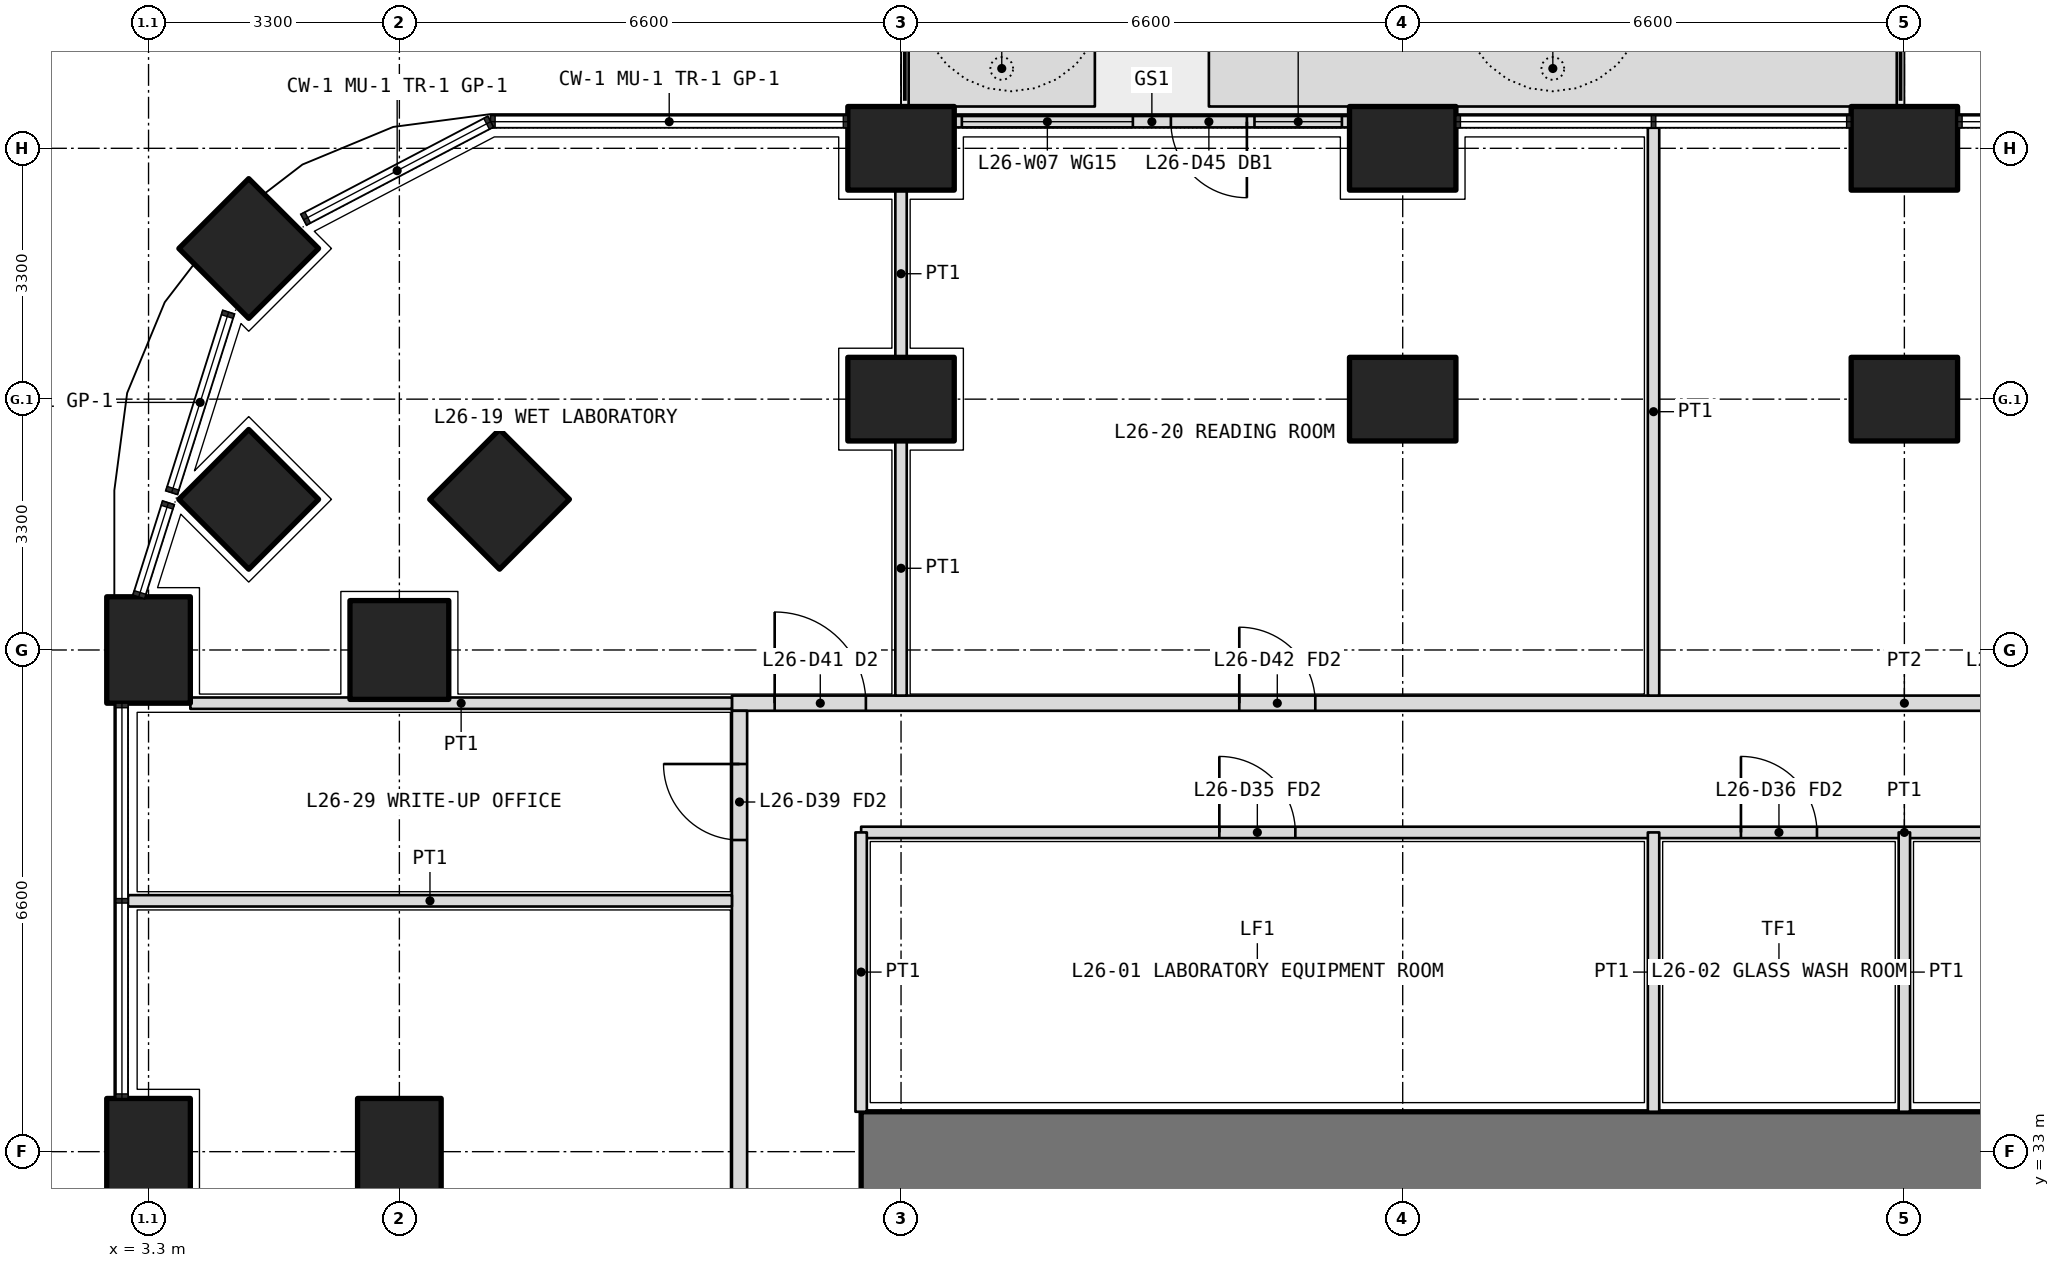
"""IFC4 building model, lengths in metres.
Left out: names, types, materials, properties, quantities, classifications, styles, units other than length and angle.
Written with IfcOpenShell. Run it as: python <this file> out.ifc"""

import sys

from ifc_helpers import new_model, si_unit, direction, frame, frame_2d, origin, origin_2d, place, context, subcontext, project, spatial, polyline, rectangle, outline, extrude, element, fill, save


model = new_model("IFC4")
c1 = context("Model", 3, precision=1e-05, world=origin(), true_north=direction((0.0, 1.0)))
c2 = subcontext(c1, "Body", "Model", "MODEL_VIEW")
j1 = project(units=[si_unit("LENGTHUNIT", "METRE"), si_unit("PLANEANGLEUNIT", "RADIAN")], contexts=[c1])
p1 = place(None, origin())
s1 = spatial("IfcSite", under=j1, at=p1, CompositionType="ELEMENT")
p2 = place(p1, origin())
s2 = spatial("IfcBuilding", under=s1, at=p2, CompositionType="ELEMENT")
p3 = place(p2, frame((0.0, 0.0, 115.8)))
s3 = spatial("IfcBuildingStorey", under=s2, at=p3, CompositionType="ELEMENT", Elevation=115.8)
p4 = place(p3, frame((4.618, 44.882, 0.0), z_axis=(0.0, 0.0, 1.0), x_axis=(0.707106781187, 0.707106781187, 0.0)))
e1 = element("IfcColumn", 1, at=p4, inside=s3, PredefinedType="COLUMN", context=c2, shape_type="SweptSolid", body=[
    extrude(rectangle(XDim=1.3, YDim=1.3, at=origin_2d()), origin(), (0.0, 0.0, 1.0), 4.2),
])
for number, where, z_axis, x_axis in (
    (2, (3.3, 33.0, 0.0), (0.0, 0.0, 1.0), (0.0, 1.0, 0.0)),
    (3, (3.3, 39.6, 0.0), (0.0, 0.0, 1.0), (0.0, 1.0, 0.0)),
    (4, (13.2, 46.2, 0.0), (0.0, 0.0, 1.0), (1.0, 0.0, 0.0)),
    (5, (19.8, 46.2, 0.0), (0.0, 0.0, 1.0), (1.0, 0.0, 0.0)),
    (6, (26.4, 46.2, 0.0), (0.0, 0.0, 1.0), (1.0, 0.0, 0.0)),
):
    element("IfcColumn", number, at=place(p3, frame(where, z_axis=z_axis, x_axis=x_axis)), inside=s3, PredefinedType="COLUMN", context=c2, shape_type="SweptSolid", body=[
        extrude(rectangle(XDim=1.4, YDim=1.1, at=origin_2d()), origin(), (0.0, 0.0, 1.0), 4.2),
    ])
for number, where, z_axis, x_axis in (
    (7, (6.6, 39.6, 0.0), (0.0, 0.0, 1.0), (1.0, 0.0, 0.0)),
    (8, (4.618, 41.582, 0.0), (0.0, 0.0, 1.0), (0.707, 0.707, 0.0)),
):
    element("IfcColumn", number, at=place(p3, frame(where, z_axis=z_axis, x_axis=x_axis)), inside=s3, PredefinedType="COLUMN", context=c2, shape_type="SweptSolid", body=[
        extrude(rectangle(XDim=1.3, YDim=1.3, at=origin_2d()), origin(), (0.0, 0.0, 1.0), 4.2),
    ])
for number, where, z_axis, x_axis in (
    (9, (13.2, 42.9, 0.0), (0.0, 0.0, 1.0), (1.0, 0.0, 0.0)),
    (10, (19.8, 42.9, 0.0), (0.0, 0.0, 1.0), (1.0, 0.0, 0.0)),
    (11, (26.4, 42.9, 0.0), (0.0, 0.0, 1.0), (1.0, 0.0, 0.0)),
):
    element("IfcColumn", number, at=place(p3, frame(where, z_axis=z_axis, x_axis=x_axis)), inside=s3, PredefinedType="COLUMN", context=c2, shape_type="SweptSolid", body=[
        extrude(rectangle(XDim=1.4, YDim=1.1, at=origin_2d()), origin(), (0.0, 0.0, 1.0), 4.2),
    ])
p5 = place(p3, frame((7.918, 41.582, 0.0), z_axis=(0.0, 0.0, 1.0), x_axis=(0.707106781187, 0.707106781187, 0.0)))
e12 = element("IfcColumn", 12, at=p5, inside=s3, PredefinedType="COLUMN", context=c2, shape_type="SweptSolid", body=[
    extrude(rectangle(XDim=1.3, YDim=1.3, at=origin_2d()), origin(), (0.0, 0.0, 1.0), 4.2),
])
p6 = place(p3, frame((6.6, 33.0, 0.0), z_axis=(0.0, 0.0, 1.0), x_axis=(0.0, 1.0, 0.0)))
e13 = element("IfcColumn", 13, at=p6, inside=s3, PredefinedType="COLUMN", context=c2, shape_type="SweptSolid", body=[
    extrude(rectangle(XDim=1.4, YDim=1.1, at=origin_2d()), origin(), (0.0, 0.0, 1.0), 4.2),
])
p7 = place(p3, origin())
e14 = element("IfcWall", 14, at=p7, inside=s3, PredefinedType="USERDEFINED", context=c2, shape_type="SweptSolid", body=[
    extrude(outline(polyline([(13.3, 46.75), (15.75, 46.75), (15.75, 47.75), (13.3, 47.75), (13.3, 46.75)]), holes=[polyline([(13.45, 46.9), (15.6, 46.9), (15.6, 47.6), (13.45, 47.6), (13.45, 46.9)])]), origin(), (0.0, 0.0, 1.0), 1.05),
])
p8 = place(p3, origin())
e15 = element("IfcWall", 15, at=p8, inside=s3, PredefinedType="USERDEFINED", context=c2, shape_type="SweptSolid", body=[
    extrude(outline(polyline([(17.25, 46.75), (26.3, 46.75), (26.3, 47.75), (17.25, 47.75), (17.25, 46.75)]), holes=[polyline([(17.4, 46.9), (26.15, 46.9), (26.15, 47.6), (17.4, 47.6), (17.4, 46.9)])]), origin(), (0.0, 0.0, 1.0), 1.05),
])
p9 = place(p3, frame((19.1, 46.55, 0.0), z_axis=(0.0, 0.0, 1.0), x_axis=(-1.0, 0.0, 0.0)))
e16 = element("IfcWall", 16, at=p9, inside=s3, PredefinedType="SOLIDWALL", context=c2, shape_type="SweptSolid", body=[
    extrude(rectangle(XDim=5.2, YDim=0.15, at=frame_2d((2.6, 0.0))), origin(), (0.0, 0.0, 1.0), 2.7),
])
p10 = place(p9, frame((1.35, 0.0, 0.0)))
e17 = element("IfcOpeningElement", 17, at=p10, cuts=e16, PredefinedType="OPENING", context=c2, shape_type="SweptSolid", body=[
    extrude(rectangle(XDim=1.0, YDim=2.4, at=frame_2d((0.5, 1.2))), frame((0.0, 0.085, 0.0), z_axis=(0.0, -1.0, 0.0), x_axis=(1.0, 0.0, 0.0)), (0.0, 0.0, 1.0), 0.17),
])
p11 = place(p9, frame((0.1, 0.0, 0.1)))
e18 = element("IfcOpeningElement", 18, at=p11, cuts=e16, PredefinedType="OPENING", context=c2, shape_type="SweptSolid", body=[
    extrude(rectangle(XDim=1.15, YDim=2.3, at=frame_2d((0.575, 1.15))), frame((0.0, 0.085, 0.0), z_axis=(0.0, -1.0, 0.0), x_axis=(1.0, 0.0, 0.0)), (0.0, 0.0, 1.0), 0.17),
])
p12 = place(p9, frame((2.85, 0.0, 0.1)))
e19 = element("IfcOpeningElement", 19, at=p12, cuts=e16, PredefinedType="OPENING", context=c2, shape_type="SweptSolid", body=[
    extrude(rectangle(XDim=2.25, YDim=2.3, at=frame_2d((1.125, 1.15))), frame((0.0, 0.085, 0.0), z_axis=(0.0, -1.0, 0.0), x_axis=(1.0, 0.0, 0.0)), (0.0, 0.0, 1.0), 0.17),
])
p13 = place(p3, frame((40.125, 33.0, 0.0), z_axis=(0.0, 0.0, 1.0), x_axis=(-1.0, 0.0, 0.0)))
e20 = element("IfcWall", 20, at=p13, inside=s3, PredefinedType="SHEAR", context=c2, shape_type="SweptSolid", body=[
    extrude(rectangle(XDim=27.45, YDim=1.05, at=frame_2d((13.725, 0.0))), origin(), (0.0, 0.0, 1.0), 4.2),
])
p14 = place(p3, frame((12.675, 37.2, 0.0), z_axis=(0.0, 0.0, 1.0), x_axis=(1.0, 0.0, 0.0)))
e21 = element("IfcWall", 21, at=p14, inside=s3, PredefinedType="PARTITIONING", context=c2, shape_type="SweptSolid", body=[
    extrude(rectangle(XDim=27.45, YDim=0.15, at=frame_2d((13.725, 0.0))), origin(), (0.0, 0.0, 1.0), 2.85),
])
p15 = place(p14, frame((4.712, 0.0, 0.0)))
e22 = element("IfcOpeningElement", 22, at=p15, cuts=e21, PredefinedType="OPENING", context=c2, shape_type="SweptSolid", body=[
    extrude(rectangle(XDim=1.0, YDim=2.1, at=frame_2d((0.5, 1.05))), frame((0.0, 0.085, 0.0), z_axis=(0.0, -1.0, 0.0), x_axis=(1.0, 0.0, 0.0)), (0.0, 0.0, 1.0), 0.17),
])
p16 = place(p14, frame((11.575, 0.0, 0.0)))
e23 = element("IfcOpeningElement", 23, at=p16, cuts=e21, PredefinedType="OPENING", context=c2, shape_type="SweptSolid", body=[
    extrude(rectangle(XDim=1.0, YDim=2.1, at=frame_2d((0.5, 1.05))), frame((0.0, 0.085, 0.0), z_axis=(0.0, -1.0, 0.0), x_axis=(1.0, 0.0, 0.0)), (0.0, 0.0, 1.0), 0.17),
])
p17 = place(p14, frame((18.175, 0.0, 0.0)))
e24 = element("IfcOpeningElement", 24, at=p17, cuts=e21, PredefinedType="OPENING", context=c2, shape_type="SweptSolid", body=[
    extrude(rectangle(XDim=1.0, YDim=2.1, at=frame_2d((0.5, 1.05))), frame((0.0, 0.085, 0.0), z_axis=(0.0, -1.0, 0.0), x_axis=(1.0, 0.0, 0.0)), (0.0, 0.0, 1.0), 0.17),
])
p18 = place(p14, frame((25.038, 0.0, 0.0)))
e25 = element("IfcOpeningElement", 25, at=p18, cuts=e21, PredefinedType="OPENING", context=c2, shape_type="SweptSolid", body=[
    extrude(rectangle(XDim=1.0, YDim=2.1, at=frame_2d((0.5, 1.05))), frame((0.0, 0.085, 0.0), z_axis=(0.0, -1.0, 0.0), x_axis=(1.0, 0.0, 0.0)), (0.0, 0.0, 1.0), 0.17),
])
p19 = place(p3, frame((12.675, 33.525, 0.0), z_axis=(0.0, 0.0, 1.0), x_axis=(0.0, 1.0, 0.0)))
e26 = element("IfcWall", 26, at=p19, inside=s3, PredefinedType="PARTITIONING", context=c2, shape_type="SweptSolid", body=[
    extrude(rectangle(XDim=3.675, YDim=0.15, at=frame_2d((1.837, 0.0))), origin(), (0.0, 0.0, 1.0), 2.85),
])
p20 = place(p3, frame((23.1, 33.525, 0.0), z_axis=(0.0, 0.0, 1.0), x_axis=(0.0, 1.0, 0.0)))
e27 = element("IfcWall", 27, at=p20, inside=s3, PredefinedType="PARTITIONING", context=c2, shape_type="SweptSolid", body=[
    extrude(rectangle(XDim=3.675, YDim=0.15, at=frame_2d((1.837, 0.0))), origin(), (0.0, 0.0, 1.0), 3.9),
])
p21 = place(p3, frame((26.4, 33.525, 0.0), z_axis=(0.0, 0.0, 1.0), x_axis=(0.0, 1.0, 0.0)))
e28 = element("IfcWall", 28, at=p21, inside=s3, PredefinedType="PARTITIONING", context=c2, shape_type="SweptSolid", body=[
    extrude(rectangle(XDim=3.675, YDim=0.15, at=frame_2d((1.837, 0.0))), origin(), (0.0, 0.0, 1.0), 2.85),
])
p22 = place(p3, frame((10.975, 38.9, 0.0), z_axis=(0.0, 0.0, 1.0), x_axis=(1.0, 0.0, 0.0)))
e29 = element("IfcWall", 29, at=p22, inside=s3, PredefinedType="PARTITIONING", context=c2, shape_type="SweptSolid", body=[
    extrude(rectangle(XDim=30.85, YDim=0.2, at=frame_2d((15.425, 0.0))), origin(), (0.0, 0.0, 1.0), 2.85),
])
p23 = place(p22, frame((0.562, 0.0, 0.0)))
e30 = element("IfcOpeningElement", 30, at=p23, cuts=e29, PredefinedType="OPENING", context=c2, shape_type="SweptSolid", body=[
    extrude(rectangle(XDim=1.2, YDim=2.1, at=frame_2d((0.6, 1.05))), frame((0.0, 0.11, 0.0), z_axis=(0.0, -1.0, 0.0), x_axis=(1.0, 0.0, 0.0)), (0.0, 0.0, 1.0), 0.22),
])
p24 = place(p22, frame((6.675, 0.0, 0.0)))
e31 = element("IfcOpeningElement", 31, at=p24, cuts=e29, PredefinedType="OPENING", context=c2, shape_type="SweptSolid", body=[
    extrude(rectangle(XDim=1.0, YDim=2.1, at=frame_2d((0.5, 1.05))), frame((0.0, 0.11, 0.0), z_axis=(0.0, -1.0, 0.0), x_axis=(1.0, 0.0, 0.0)), (0.0, 0.0, 1.0), 0.22),
])
p25 = place(p22, frame((16.575, 0.0, 0.0)))
e32 = element("IfcOpeningElement", 32, at=p25, cuts=e29, PredefinedType="OPENING", context=c2, shape_type="SweptSolid", body=[
    extrude(rectangle(XDim=1.0, YDim=2.1, at=frame_2d((0.5, 1.05))), frame((0.0, 0.11, 0.0), z_axis=(0.0, -1.0, 0.0), x_axis=(1.0, 0.0, 0.0)), (0.0, 0.0, 1.0), 0.22),
])
p26 = place(p22, frame((25.887, 0.0, 0.0)))
e33 = element("IfcOpeningElement", 33, at=p26, cuts=e29, PredefinedType="OPENING", context=c2, shape_type="SweptSolid", body=[
    extrude(rectangle(XDim=1.0, YDim=2.1, at=frame_2d((0.5, 1.05))), frame((0.0, 0.11, 0.0), z_axis=(0.0, -1.0, 0.0), x_axis=(1.0, 0.0, 0.0)), (0.0, 0.0, 1.0), 0.22),
])
p27 = place(p3, frame((11.075, 11.175, 0.0), z_axis=(0.0, 0.0, 1.0), x_axis=(0.0, 1.0, 0.0)))
e34 = element("IfcWall", 34, at=p27, inside=s3, PredefinedType="PARTITIONING", context=c2, shape_type="SweptSolid", body=[
    extrude(rectangle(XDim=27.625, YDim=0.2, at=frame_2d((13.812, 0.0))), origin(), (0.0, 0.0, 1.0), 2.85),
])
p28 = place(p27, frame((0.462, 0.0, 0.0)))
e35 = element("IfcOpeningElement", 35, at=p28, cuts=e34, PredefinedType="OPENING", context=c2, shape_type="SweptSolid", body=[
    extrude(rectangle(XDim=1.0, YDim=2.1, at=frame_2d((0.5, 1.05))), frame((0.0, 0.11, 0.0), z_axis=(0.0, -1.0, 0.0), x_axis=(1.0, 0.0, 0.0)), (0.0, 0.0, 1.0), 0.22),
])
p29 = place(p27, frame((2.575, 0.0, 0.0)))
e36 = element("IfcOpeningElement", 36, at=p29, cuts=e34, PredefinedType="OPENING", context=c2, shape_type="SweptSolid", body=[
    extrude(rectangle(XDim=1.0, YDim=2.1, at=frame_2d((0.5, 1.05))), frame((0.0, 0.11, 0.0), z_axis=(0.0, -1.0, 0.0), x_axis=(1.0, 0.0, 0.0)), (0.0, 0.0, 1.0), 0.22),
])
p30 = place(p27, frame((5.625, 0.0, 0.0)))
e37 = element("IfcOpeningElement", 37, at=p30, cuts=e34, PredefinedType="OPENING", context=c2, shape_type="SweptSolid", body=[
    extrude(rectangle(XDim=0.9, YDim=2.1, at=frame_2d((0.45, 1.05))), frame((0.0, 0.11, 0.0), z_axis=(0.0, -1.0, 0.0), x_axis=(1.0, 0.0, 0.0)), (0.0, 0.0, 1.0), 0.22),
])
p31 = place(p27, frame((9.425, 0.0, 0.0)))
e38 = element("IfcOpeningElement", 38, at=p31, cuts=e34, PredefinedType="OPENING", context=c2, shape_type="SweptSolid", body=[
    extrude(rectangle(XDim=0.9, YDim=2.1, at=frame_2d((0.45, 1.05))), frame((0.0, 0.11, 0.0), z_axis=(0.0, -1.0, 0.0), x_axis=(1.0, 0.0, 0.0)), (0.0, 0.0, 1.0), 0.22),
])
p32 = place(p27, frame((12.975, 0.0, 0.0)))
e39 = element("IfcOpeningElement", 39, at=p32, cuts=e34, PredefinedType="OPENING", context=c2, shape_type="SweptSolid", body=[
    extrude(rectangle(XDim=1.0, YDim=2.1, at=frame_2d((0.5, 1.05))), frame((0.0, 0.11, 0.0), z_axis=(0.0, -1.0, 0.0), x_axis=(1.0, 0.0, 0.0)), (0.0, 0.0, 1.0), 0.22),
])
p33 = place(p27, frame((19.675, 0.0, 0.0)))
e40 = element("IfcOpeningElement", 40, at=p33, cuts=e34, PredefinedType="OPENING", context=c2, shape_type="SweptSolid", body=[
    extrude(rectangle(XDim=1.0, YDim=2.1, at=frame_2d((0.5, 1.05))), frame((0.0, 0.11, 0.0), z_axis=(0.0, -1.0, 0.0), x_axis=(1.0, 0.0, 0.0)), (0.0, 0.0, 1.0), 0.22),
])
p34 = place(p27, frame((25.925, 0.0, 0.0)))
e41 = element("IfcOpeningElement", 41, at=p34, cuts=e34, PredefinedType="OPENING", context=c2, shape_type="SweptSolid", body=[
    extrude(rectangle(XDim=1.0, YDim=2.1, at=frame_2d((0.5, 1.05))), frame((0.0, 0.11, 0.0), z_axis=(0.0, -1.0, 0.0), x_axis=(1.0, 0.0, 0.0)), (0.0, 0.0, 1.0), 0.22),
])
p35 = place(p3, frame((3.85, 38.9, 0.0), z_axis=(0.0, 0.0, 1.0), x_axis=(1.0, 0.0, 0.0)))
e42 = element("IfcWall", 42, at=p35, inside=s3, PredefinedType="PARTITIONING", context=c2, shape_type="SweptSolid", body=[
    extrude(rectangle(XDim=7.125, YDim=0.15, at=frame_2d((3.562, 0.0))), origin(), (0.0, 0.0, 1.0), 2.85),
])
p36 = place(p3, frame((13.2, 45.65, 0.0), z_axis=(0.0, 0.0, 1.0), x_axis=(0.0, -1.0, 0.0)))
e43 = element("IfcWall", 43, at=p36, inside=s3, PredefinedType="PARTITIONING", context=c2, shape_type="SweptSolid", body=[
    extrude(rectangle(XDim=2.2, YDim=0.15, at=frame_2d((1.1, 0.0))), origin(), (0.0, 0.0, 1.0), 2.85),
])
p37 = place(p3, frame((13.2, 42.35, 0.0), z_axis=(0.0, 0.0, 1.0), x_axis=(0.0, -1.0, 0.0)))
e44 = element("IfcWall", 44, at=p37, inside=s3, PredefinedType="PARTITIONING", context=c2, shape_type="SweptSolid", body=[
    extrude(rectangle(XDim=3.35, YDim=0.15, at=frame_2d((1.675, 0.0))), origin(), (0.0, 0.0, 1.0), 2.85),
])
p38 = place(p3, frame((23.1, 46.47, 0.0), z_axis=(0.0, 0.0, 1.0), x_axis=(0.0, -1.0, 0.0)))
e45 = element("IfcWall", 45, at=p38, inside=s3, PredefinedType="PARTITIONING", context=c2, shape_type="SweptSolid", body=[
    extrude(rectangle(XDim=7.47, YDim=0.15, at=frame_2d((3.735, 0.0))), origin(), (0.0, 0.0, 1.0), 2.7),
])
p39 = place(p3, frame((3.03, 36.3, 0.0), z_axis=(0.0, 0.0, 1.0), x_axis=(1.0, 0.0, 0.0)))
e46 = element("IfcWall", 46, at=p39, inside=s3, PredefinedType="PARTITIONING", context=c2, shape_type="SweptSolid", body=[
    extrude(rectangle(XDim=7.945, YDim=0.15, at=frame_2d((3.973, 0.0))), origin(), (0.0, 0.0, 1.0), 2.7),
])
p40 = place(p10, origin())
e47 = element("IfcDoor", 47, at=p40, inside=s3, OperationType="SINGLE_SWING_LEFT", PredefinedType="DOOR", context=c2, shape_type="SweptSolid", body=[
    extrude(rectangle(XDim=1.0, YDim=2.4, at=frame_2d((0.5, 1.2))), frame((0.0, 0.025, 0.0), z_axis=(0.0, -1.0, 0.0), x_axis=(1.0, 0.0, 0.0)), (0.0, 0.0, 1.0), 0.05),
])
fill(e17, e47)
p41 = place(p11, origin())
e48 = element("IfcWindow", 48, at=p41, inside=s3, PartitioningType="SINGLE_PANEL", PredefinedType="WINDOW", context=c2, shape_type="SweptSolid", body=[
    extrude(rectangle(XDim=1.15, YDim=2.3, at=frame_2d((0.575, 1.15))), frame((0.0, 0.03, 0.0), z_axis=(0.0, -1.0, 0.0), x_axis=(1.0, 0.0, 0.0)), (0.0, 0.0, 1.0), 0.06),
])
fill(e18, e48)
p42 = place(p12, origin())
e49 = element("IfcWindow", 49, at=p42, inside=s3, PartitioningType="SINGLE_PANEL", PredefinedType="WINDOW", context=c2, shape_type="SweptSolid", body=[
    extrude(rectangle(XDim=2.25, YDim=2.3, at=frame_2d((1.125, 1.15))), frame((0.0, 0.03, 0.0), z_axis=(0.0, -1.0, 0.0), x_axis=(1.0, 0.0, 0.0)), (0.0, 0.0, 1.0), 0.06),
])
fill(e19, e49)
p43 = place(p15, origin())
e50 = element("IfcDoor", 50, at=p43, inside=s3, OperationType="SINGLE_SWING_LEFT", PredefinedType="DOOR", context=c2, shape_type="SweptSolid", body=[
    extrude(rectangle(XDim=1.0, YDim=2.1, at=frame_2d((0.5, 1.05))), frame((0.0, 0.025, 0.0), z_axis=(0.0, -1.0, 0.0), x_axis=(1.0, 0.0, 0.0)), (0.0, 0.0, 1.0), 0.05),
])
fill(e22, e50)
p44 = place(p16, origin())
e51 = element("IfcDoor", 51, at=p44, inside=s3, OperationType="SINGLE_SWING_LEFT", PredefinedType="DOOR", context=c2, shape_type="SweptSolid", body=[
    extrude(rectangle(XDim=1.0, YDim=2.1, at=frame_2d((0.5, 1.05))), frame((0.0, 0.025, 0.0), z_axis=(0.0, -1.0, 0.0), x_axis=(1.0, 0.0, 0.0)), (0.0, 0.0, 1.0), 0.05),
])
fill(e23, e51)
p45 = place(p23, origin())
e52 = element("IfcDoor", 52, at=p45, inside=s3, OperationType="DOUBLE_DOOR_SINGLE_SWING", PredefinedType="DOOR", context=c2, shape_type="SweptSolid", body=[
    extrude(rectangle(XDim=1.2, YDim=2.1, at=frame_2d((0.6, 1.05))), frame((0.0, 0.025, 0.0), z_axis=(0.0, -1.0, 0.0), x_axis=(1.0, 0.0, 0.0)), (0.0, 0.0, 1.0), 0.05),
])
fill(e30, e52)
p46 = place(p24, origin())
e53 = element("IfcDoor", 53, at=p46, inside=s3, OperationType="SINGLE_SWING_LEFT", PredefinedType="DOOR", context=c2, shape_type="SweptSolid", body=[
    extrude(rectangle(XDim=1.0, YDim=2.1, at=frame_2d((0.5, 1.05))), frame((0.0, 0.025, 0.0), z_axis=(0.0, -1.0, 0.0), x_axis=(1.0, 0.0, 0.0)), (0.0, 0.0, 1.0), 0.05),
])
fill(e31, e53)
p47 = place(p34, origin())
e54 = element("IfcDoor", 54, at=p47, inside=s3, OperationType="SINGLE_SWING_RIGHT", PredefinedType="DOOR", context=c2, shape_type="SweptSolid", body=[
    extrude(rectangle(XDim=1.0, YDim=2.1, at=frame_2d((0.5, 1.05))), frame((0.0, 0.025, 0.0), z_axis=(0.0, -1.0, 0.0), x_axis=(1.0, 0.0, 0.0)), (0.0, 0.0, 1.0), 0.05),
])
fill(e41, e54)
save(model, sys.argv[1])
